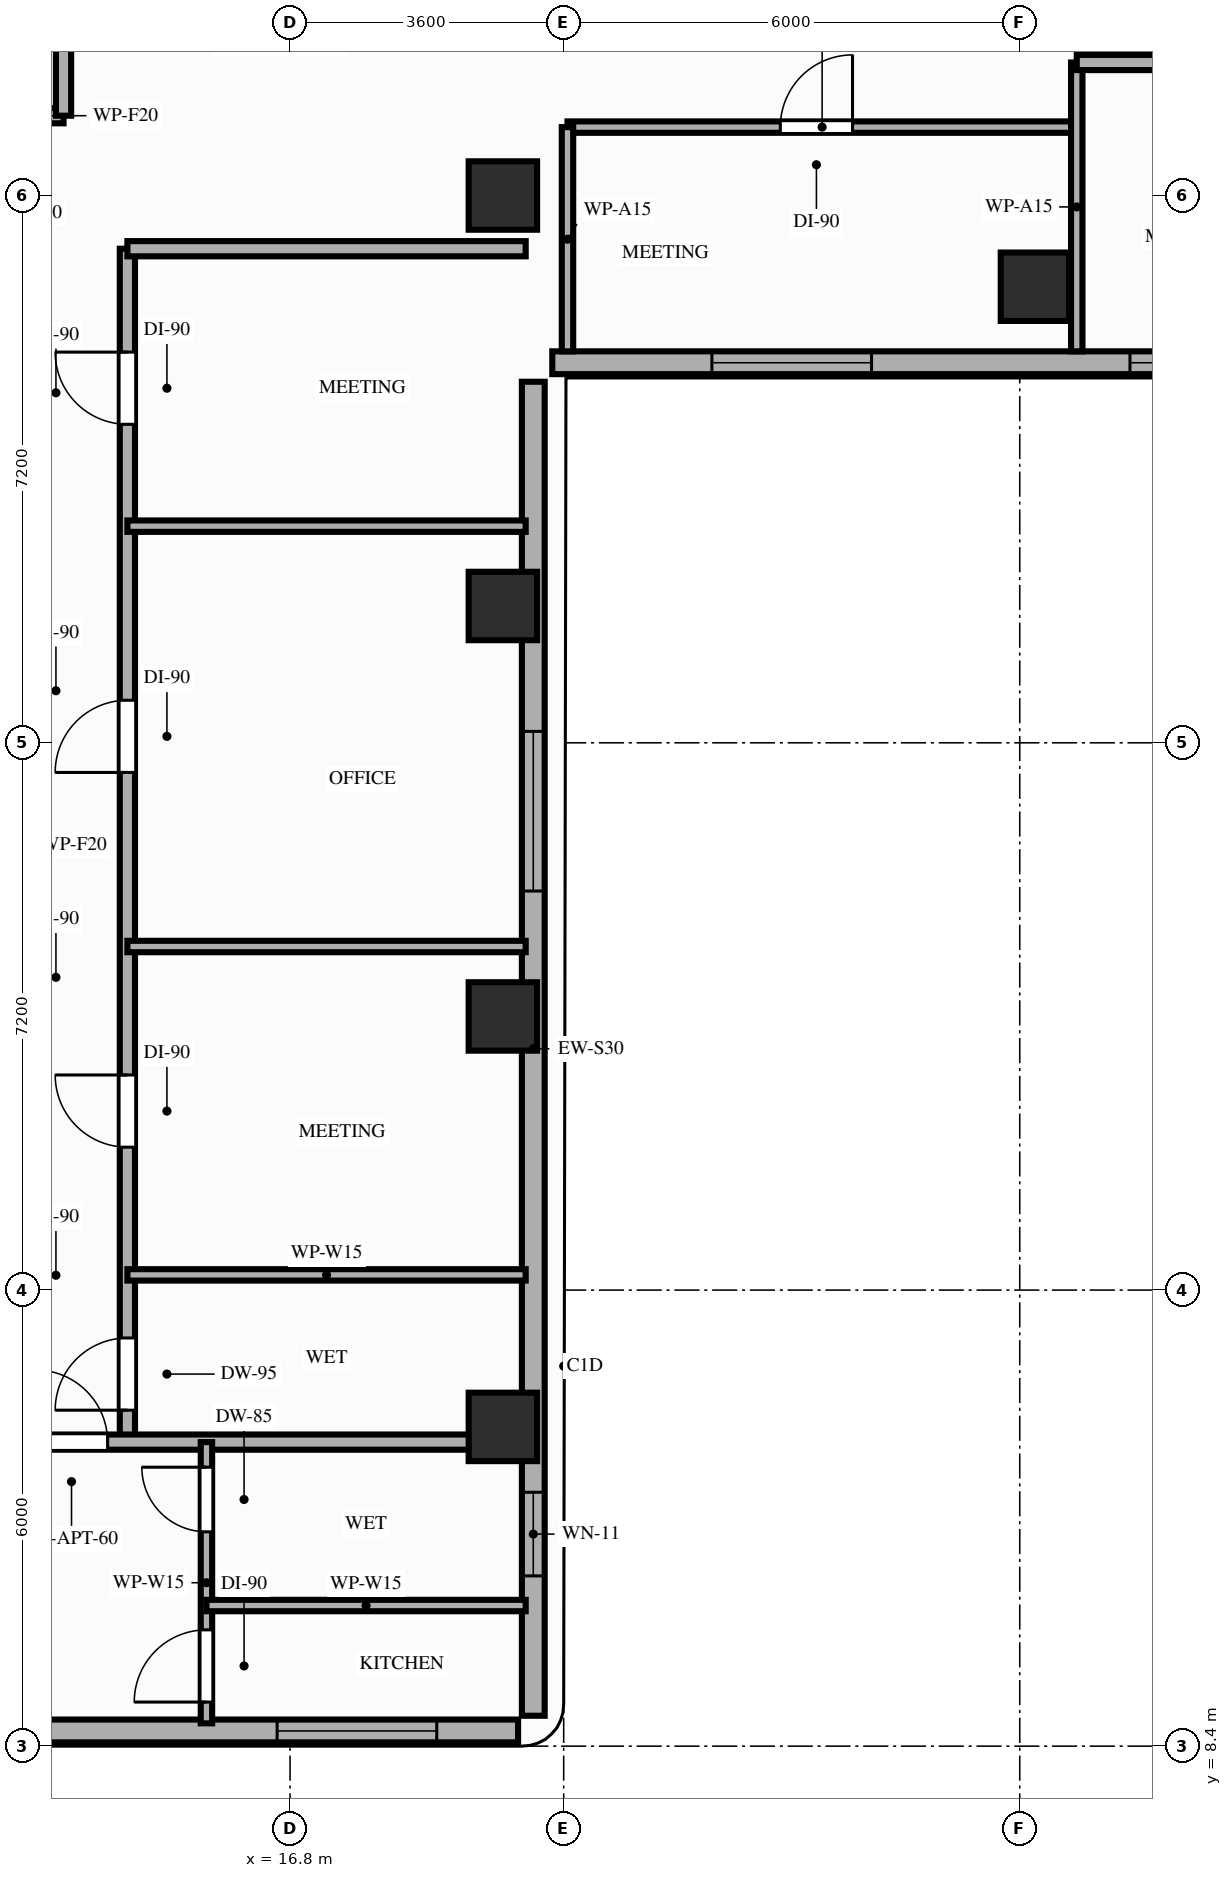
"""IFC4 building model, lengths in metres.
Left out: names, types, materials, properties, quantities, classifications, styles, units other than length and angle.
Written with IfcOpenShell. Run it as: python <this file> out.ifc"""

import sys

from ifc_helpers import new_model, si_unit, direction, frame, frame_2d, origin, origin_2d, place, context, subcontext, project, spatial, rectangle, extrude, element, fill, save


model = new_model("IFC4")
c1 = context("Model", 3, precision=1e-05, world=origin(), true_north=direction((0.0, 1.0)))
c2 = subcontext(c1, "Body", "Model", "MODEL_VIEW")
j1 = project(units=[si_unit("LENGTHUNIT", "METRE"), si_unit("PLANEANGLEUNIT", "RADIAN")], contexts=[c1])
p1 = place(None, origin())
s1 = spatial("IfcSite", under=j1, at=p1, CompositionType="ELEMENT")
p2 = place(p1, origin())
s2 = spatial("IfcBuilding", under=s1, at=p2, CompositionType="ELEMENT")
p3 = place(p2, frame((0.0, 0.0, 188.8)))
s3 = spatial("IfcBuildingStorey", under=s2, at=p3, CompositionType="ELEMENT", Elevation=188.8)
for number, where, z_axis, x_axis in (
    (1, (19.6, 12.6, 0.0), (0.0, 0.0, 1.0), (1.0, 0.0, 0.0)),
    (2, (19.6, 18.0, 0.0), (0.0, 0.0, 1.0), (1.0, 0.0, 0.0)),
    (3, (19.6, 23.4, 0.0), (0.0, 0.0, 1.0), (1.0, 0.0, 0.0)),
    (4, (19.6, 28.8, 0.0), (0.0, 0.0, 1.0), (1.0, 0.0, 0.0)),
    (5, (26.6, 27.6, 0.0), (0.0, 0.0, 1.0), (1.0, 0.0, 0.0)),
):
    element("IfcColumn", number, at=place(p3, frame(where, z_axis=z_axis, x_axis=x_axis)), inside=s3, PredefinedType="COLUMN", context=c2, shape_type="SweptSolid", body=[
        extrude(rectangle(XDim=0.9, YDim=0.9, at=origin_2d()), origin(), (0.0, 0.0, 1.0), 3.2),
    ])
p4 = place(p3, frame((4.0, 8.6, 0.0), z_axis=(0.0, 0.0, 1.0), x_axis=(1.0, 0.0, 0.0)))
e6 = element("IfcWall", 6, at=p4, inside=s3, PredefinedType="STANDARD", context=c2, shape_type="SweptSolid", body=[
    extrude(rectangle(XDim=15.8, YDim=0.3, at=frame_2d((7.9, 0.0))), origin(), (0.0, 0.0, 1.0), 3.02),
])
p5 = place(p4, frame((0.92, 0.0, 0.85)))
e7 = element("IfcOpeningElement", 7, at=p5, cuts=e6, PredefinedType="OPENING", context=c2, shape_type="SweptSolid", body=[
    extrude(rectangle(XDim=2.1, YDim=1.8, at=frame_2d((1.05, 0.9))), frame((0.0, 0.16, 0.0), z_axis=(0.0, -1.0, 0.0), x_axis=(1.0, 0.0, 0.0)), (0.0, 0.0, 1.0), 0.32),
])
p6 = place(p4, frame((6.7, 0.0, 0.85)))
e8 = element("IfcOpeningElement", 8, at=p6, cuts=e6, PredefinedType="OPENING", context=c2, shape_type="SweptSolid", body=[
    extrude(rectangle(XDim=2.1, YDim=1.8, at=frame_2d((1.05, 0.9))), frame((0.0, 0.16, 0.0), z_axis=(0.0, -1.0, 0.0), x_axis=(1.0, 0.0, 0.0)), (0.0, 0.0, 1.0), 0.32),
])
p7 = place(p4, frame((12.63, 0.0, 0.85)))
e9 = element("IfcOpeningElement", 9, at=p7, cuts=e6, PredefinedType="OPENING", context=c2, shape_type="SweptSolid", body=[
    extrude(rectangle(XDim=2.1, YDim=1.8, at=frame_2d((1.05, 0.9))), frame((0.0, 0.16, 0.0), z_axis=(0.0, -1.0, 0.0), x_axis=(1.0, 0.0, 0.0)), (0.0, 0.0, 1.0), 0.32),
])
p8 = place(p3, frame((20.0, 8.8, 0.0), z_axis=(0.0, 0.0, 1.0), x_axis=(0.0, 1.0, 0.0)))
e10 = element("IfcWall", 10, at=p8, inside=s3, PredefinedType="STANDARD", context=c2, shape_type="SweptSolid", body=[
    extrude(rectangle(XDim=17.55, YDim=0.3, at=frame_2d((8.775, 0.0))), origin(), (0.0, 0.0, 1.0), 2.51),
])
p9 = place(p8, frame((1.84, 0.0, 0.85)))
e11 = element("IfcOpeningElement", 11, at=p9, cuts=e10, PredefinedType="OPENING", context=c2, shape_type="SweptSolid", body=[
    extrude(rectangle(XDim=1.1, YDim=1.41, at=frame_2d((0.55, 0.705))), frame((0.0, 0.16, 0.0), z_axis=(0.0, -1.0, 0.0), x_axis=(1.0, 0.0, 0.0)), (0.0, 0.0, 1.0), 0.32),
])
p10 = place(p8, frame((10.85, 0.0, 0.85)))
e12 = element("IfcOpeningElement", 12, at=p10, cuts=e10, PredefinedType="OPENING", context=c2, shape_type="SweptSolid", body=[
    extrude(rectangle(XDim=2.1, YDim=1.41, at=frame_2d((1.05, 0.705))), frame((0.0, 0.16, 0.0), z_axis=(0.0, -1.0, 0.0), x_axis=(1.0, 0.0, 0.0)), (0.0, 0.0, 1.0), 0.32),
])
p11 = place(p3, frame((20.25, 26.6, 0.0), z_axis=(0.0, 0.0, 1.0), x_axis=(1.0, 0.0, 0.0)))
e13 = element("IfcWall", 13, at=p11, inside=s3, PredefinedType="STANDARD", context=c2, shape_type="SweptSolid", body=[
    extrude(rectangle(XDim=21.35, YDim=0.3, at=frame_2d((10.675, 0.0))), origin(), (0.0, 0.0, 1.0), 2.71),
])
p12 = place(p11, frame((13.9, 0.0, 0.0)))
e14 = element("IfcOpeningElement", 14, at=p12, cuts=e13, PredefinedType="OPENING", context=c2, shape_type="SweptSolid", body=[
    extrude(rectangle(XDim=1.3, YDim=2.08, at=frame_2d((0.65, 1.04))), frame((0.0, 0.16, 0.0), z_axis=(0.0, -1.0, 0.0), x_axis=(1.0, 0.0, 0.0)), (0.0, 0.0, 1.0), 0.32),
])
p13 = place(p11, frame((17.73, 0.0, 0.85)))
e15 = element("IfcOpeningElement", 15, at=p13, cuts=e13, PredefinedType="OPENING", context=c2, shape_type="SweptSolid", body=[
    extrude(rectangle(XDim=2.1, YDim=1.61, at=frame_2d((1.05, 0.805))), frame((0.0, 0.16, 0.0), z_axis=(0.0, -1.0, 0.0), x_axis=(1.0, 0.0, 0.0)), (0.0, 0.0, 1.0), 0.32),
])
p14 = place(p11, frame((2.1, 0.0, 0.85)))
e16 = element("IfcOpeningElement", 16, at=p14, cuts=e13, PredefinedType="OPENING", context=c2, shape_type="SweptSolid", body=[
    extrude(rectangle(XDim=2.1, YDim=1.61, at=frame_2d((1.05, 0.805))), frame((0.0, 0.16, 0.0), z_axis=(0.0, -1.0, 0.0), x_axis=(1.0, 0.0, 0.0)), (0.0, 0.0, 1.0), 0.32),
])
p15 = place(p11, frame((7.6, 0.0, 0.85)))
e17 = element("IfcOpeningElement", 17, at=p15, cuts=e13, PredefinedType="OPENING", context=c2, shape_type="SweptSolid", body=[
    extrude(rectangle(XDim=2.1, YDim=1.61, at=frame_2d((1.05, 0.805))), frame((0.0, 0.16, 0.0), z_axis=(0.0, -1.0, 0.0), x_axis=(1.0, 0.0, 0.0)), (0.0, 0.0, 1.0), 0.32),
])
p16 = place(p3, frame((12.55, 29.85, 0.0), z_axis=(0.0, 0.0, 1.0), x_axis=(1.0, 0.0, 0.0)))
e18 = element("IfcWall", 18, at=p16, inside=s3, PredefinedType="PARTITIONING", context=c2, shape_type="SweptSolid", body=[
    extrude(rectangle(XDim=1.27, YDim=0.2, at=frame_2d((0.635, 0.0))), origin(), (0.0, 0.0, 1.0), 3.02),
])
p17 = place(p16, frame((0.21, 0.0, 0.0)))
e19 = element("IfcOpeningElement", 19, at=p17, cuts=e18, PredefinedType="OPENING", context=c2, shape_type="SweptSolid", body=[
    extrude(rectangle(XDim=0.85, YDim=2.05, at=frame_2d((0.425, 1.025))), frame((0.0, 0.11, 0.0), z_axis=(0.0, -1.0, 0.0), x_axis=(1.0, 0.0, 0.0)), (0.0, 0.0, 1.0), 0.22),
])
p18 = place(p3, frame((13.82, 29.85, 0.0), z_axis=(0.0, 0.0, 1.0), x_axis=(0.0, 1.0, 0.0)))
e20 = element("IfcWall", 20, at=p18, inside=s3, PredefinedType="PARTITIONING", context=c2, shape_type="SweptSolid", body=[
    extrude(rectangle(XDim=2.5, YDim=0.2, at=frame_2d((1.25, 0.0))), origin(), (0.0, 0.0, 1.0), 3.02),
])
p19 = place(p3, frame((14.66, 12.4, 0.0), z_axis=(0.0, 0.0, 1.0), x_axis=(0.0, 1.0, 0.0)))
e21 = element("IfcWall", 21, at=p19, inside=s3, PredefinedType="PARTITIONING", context=c2, shape_type="SweptSolid", body=[
    extrude(rectangle(XDim=15.7, YDim=0.2, at=frame_2d((7.85, 0.0))), origin(), (0.0, 0.0, 1.0), 2.51),
])
p20 = place(p19, frame((0.42, 0.0, 0.0)))
e22 = element("IfcOpeningElement", 22, at=p20, cuts=e21, PredefinedType="OPENING", context=c2, shape_type="SweptSolid", body=[
    extrude(rectangle(XDim=0.95, YDim=2.1, at=frame_2d((0.475, 1.05))), frame((0.0, 0.11, 0.0), z_axis=(0.0, -1.0, 0.0), x_axis=(1.0, 0.0, 0.0)), (0.0, 0.0, 1.0), 0.22),
])
p21 = place(p19, frame((3.88, 0.0, 0.0)))
e23 = element("IfcOpeningElement", 23, at=p21, cuts=e21, PredefinedType="OPENING", context=c2, shape_type="SweptSolid", body=[
    extrude(rectangle(XDim=0.95, YDim=2.15, at=frame_2d((0.475, 1.075))), frame((0.0, 0.11, 0.0), z_axis=(0.0, -1.0, 0.0), x_axis=(1.0, 0.0, 0.0)), (0.0, 0.0, 1.0), 0.22),
])
p22 = place(p19, frame((8.81, 0.0, 0.0)))
e24 = element("IfcOpeningElement", 24, at=p22, cuts=e21, PredefinedType="OPENING", context=c2, shape_type="SweptSolid", body=[
    extrude(rectangle(XDim=0.95, YDim=2.15, at=frame_2d((0.475, 1.075))), frame((0.0, 0.11, 0.0), z_axis=(0.0, -1.0, 0.0), x_axis=(1.0, 0.0, 0.0)), (0.0, 0.0, 1.0), 0.22),
])
p23 = place(p19, frame((13.39, 0.0, 0.0)))
e25 = element("IfcOpeningElement", 25, at=p23, cuts=e21, PredefinedType="OPENING", context=c2, shape_type="SweptSolid", body=[
    extrude(rectangle(XDim=0.95, YDim=2.15, at=frame_2d((0.475, 1.075))), frame((0.0, 0.11, 0.0), z_axis=(0.0, -1.0, 0.0), x_axis=(1.0, 0.0, 0.0)), (0.0, 0.0, 1.0), 0.22),
])
p24 = place(p3, frame((3.9, 12.4, 0.0), z_axis=(0.0, 0.0, 1.0), x_axis=(1.0, 0.0, 0.0)))
e26 = element("IfcWall", 26, at=p24, inside=s3, PredefinedType="PARTITIONING", context=c2, shape_type="SweptSolid", body=[
    extrude(rectangle(XDim=16.0, YDim=0.2, at=frame_2d((8.0, 0.0))), origin(), (0.0, 0.0, 1.0), 2.51),
])
p25 = place(p24, frame((9.55, 0.0, 0.0)))
e27 = element("IfcOpeningElement", 27, at=p25, cuts=e26, PredefinedType="OPENING", context=c2, shape_type="SweptSolid", body=[
    extrude(rectangle(XDim=0.95, YDim=2.15, at=frame_2d((0.475, 1.075))), frame((0.0, 0.11, 0.0), z_axis=(0.0, -1.0, 0.0), x_axis=(1.0, 0.0, 0.0)), (0.0, 0.0, 1.0), 0.22),
])
p26 = place(p3, frame((14.66, 28.1, 0.0), z_axis=(0.0, 0.0, 1.0), x_axis=(1.0, 0.0, 0.0)))
e28 = element("IfcWall", 28, at=p26, inside=s3, PredefinedType="PARTITIONING", context=c2, shape_type="SweptSolid", body=[
    extrude(rectangle(XDim=5.24, YDim=0.2, at=frame_2d((2.62, 0.0))), origin(), (0.0, 0.0, 1.0), 2.51),
])
p27 = place(p3, frame((20.45, 29.7, 0.0), z_axis=(0.0, 0.0, 1.0), x_axis=(1.0, 0.0, 0.0)))
e29 = element("IfcWall", 29, at=p27, inside=s3, PredefinedType="PARTITIONING", context=c2, shape_type="SweptSolid", body=[
    extrude(rectangle(XDim=6.7, YDim=0.15, at=frame_2d((3.35, 0.0))), origin(), (0.0, 0.0, 1.0), 3.02),
])
p28 = place(p27, frame((2.8, 0.0, 0.0)))
e30 = element("IfcOpeningElement", 30, at=p28, cuts=e29, PredefinedType="OPENING", context=c2, shape_type="SweptSolid", body=[
    extrude(rectangle(XDim=0.95, YDim=2.15, at=frame_2d((0.475, 1.075))), frame((0.0, 0.085, 0.0), z_axis=(0.0, -1.0, 0.0), x_axis=(1.0, 0.0, 0.0)), (0.0, 0.0, 1.0), 0.17),
])
p29 = place(p3, frame((20.45, 26.75, 0.0), z_axis=(0.0, 0.0, 1.0), x_axis=(0.0, 1.0, 0.0)))
e31 = element("IfcWall", 31, at=p29, inside=s3, PredefinedType="PARTITIONING", context=c2, shape_type="SweptSolid", body=[
    extrude(rectangle(XDim=2.95, YDim=0.15, at=frame_2d((1.475, 0.0))), origin(), (0.0, 0.0, 1.0), 2.51),
])
p30 = place(p3, frame((27.15, 26.75, 0.0), z_axis=(0.0, 0.0, 1.0), x_axis=(0.0, 1.0, 0.0)))
e32 = element("IfcWall", 32, at=p30, inside=s3, PredefinedType="PARTITIONING", context=c2, shape_type="SweptSolid", body=[
    extrude(rectangle(XDim=3.8, YDim=0.15, at=frame_2d((1.9, 0.0))), origin(), (0.0, 0.0, 1.0), 2.51),
])
p31 = place(p3, frame((15.7, 8.7, 0.0), z_axis=(0.0, 0.0, 1.0), x_axis=(0.0, 1.0, 0.0)))
e33 = element("IfcWall", 33, at=p31, inside=s3, PredefinedType="PARTITIONING", context=c2, shape_type="SweptSolid", body=[
    extrude(rectangle(XDim=3.7, YDim=0.15, at=frame_2d((1.85, 0.0))), origin(), (0.0, 0.0, 1.0), 2.51),
])
p32 = place(p31, frame((0.28, 0.0, 0.0)))
e34 = element("IfcOpeningElement", 34, at=p32, cuts=e33, PredefinedType="OPENING", context=c2, shape_type="SweptSolid", body=[
    extrude(rectangle(XDim=0.95, YDim=2.15, at=frame_2d((0.475, 1.075))), frame((0.0, 0.085, 0.0), z_axis=(0.0, -1.0, 0.0), x_axis=(1.0, 0.0, 0.0)), (0.0, 0.0, 1.0), 0.17),
])
p33 = place(p31, frame((2.52, 0.0, 0.0)))
e35 = element("IfcOpeningElement", 35, at=p33, cuts=e33, PredefinedType="OPENING", context=c2, shape_type="SweptSolid", body=[
    extrude(rectangle(XDim=0.85, YDim=2.1, at=frame_2d((0.425, 1.05))), frame((0.0, 0.085, 0.0), z_axis=(0.0, -1.0, 0.0), x_axis=(1.0, 0.0, 0.0)), (0.0, 0.0, 1.0), 0.17),
])
p34 = place(p3, frame((15.7, 10.25, 0.0), z_axis=(0.0, 0.0, 1.0), x_axis=(1.0, 0.0, 0.0)))
e36 = element("IfcWall", 36, at=p34, inside=s3, PredefinedType="PARTITIONING", context=c2, shape_type="SweptSolid", body=[
    extrude(rectangle(XDim=4.2, YDim=0.15, at=frame_2d((2.1, 0.0))), origin(), (0.0, 0.0, 1.0), 3.02),
])
for number, where, z_axis, x_axis in (
    (37, (14.66, 14.6, 0.0), (0.0, 0.0, 1.0), (1.0, 0.0, 0.0)),
    (38, (14.66, 18.92, 0.0), (0.0, 0.0, 1.0), (1.0, 0.0, 0.0)),
    (39, (14.66, 24.45, 0.0), (0.0, 0.0, 1.0), (1.0, 0.0, 0.0)),
):
    element("IfcWall", number, at=place(p3, frame(where, z_axis=z_axis, x_axis=x_axis)), inside=s3, PredefinedType="PARTITIONING", context=c2, shape_type="SweptSolid", body=[
        extrude(rectangle(XDim=5.24, YDim=0.15, at=frame_2d((2.62, 0.0))), origin(), (0.0, 0.0, 1.0), 2.51),
    ])
p35 = place(p3, frame((27.15, 30.55, 0.0), z_axis=(0.0, 0.0, 1.0), x_axis=(1.0, 0.0, 0.0)))
e40 = element("IfcWall", 40, at=p35, inside=s3, PredefinedType="PARTITIONING", context=c2, shape_type="SweptSolid", body=[
    extrude(rectangle(XDim=9.45, YDim=0.2, at=frame_2d((4.725, 0.0))), origin(), (0.0, 0.0, 1.0), 2.51),
])
p36 = place(p35, frame((2.5, 0.0, 0.0)))
e41 = element("IfcOpeningElement", 41, at=p36, cuts=e40, PredefinedType="OPENING", context=c2, shape_type="SweptSolid", body=[
    extrude(rectangle(XDim=0.95, YDim=2.15, at=frame_2d((0.475, 1.075))), frame((0.0, 0.11, 0.0), z_axis=(0.0, -1.0, 0.0), x_axis=(1.0, 0.0, 0.0)), (0.0, 0.0, 1.0), 0.22),
])
p37 = place(p35, frame((7.22, 0.0, 0.0)))
e42 = element("IfcOpeningElement", 42, at=p37, cuts=e40, PredefinedType="OPENING", context=c2, shape_type="SweptSolid", body=[
    extrude(rectangle(XDim=0.95, YDim=2.15, at=frame_2d((0.475, 1.075))), frame((0.0, 0.11, 0.0), z_axis=(0.0, -1.0, 0.0), x_axis=(1.0, 0.0, 0.0)), (0.0, 0.0, 1.0), 0.22),
])
p38 = place(p7, origin())
e43 = element("IfcWindow", 43, at=p38, inside=s3, PartitioningType="SINGLE_PANEL", PredefinedType="WINDOW", context=c2, shape_type="SweptSolid", body=[
    extrude(rectangle(XDim=2.1, YDim=1.8, at=frame_2d((1.05, 0.9))), frame((0.0, 0.03, 0.0), z_axis=(0.0, -1.0, 0.0), x_axis=(1.0, 0.0, 0.0)), (0.0, 0.0, 1.0), 0.06),
])
fill(e9, e43)
p39 = place(p9, origin())
e44 = element("IfcWindow", 44, at=p39, inside=s3, PartitioningType="SINGLE_PANEL", PredefinedType="WINDOW", context=c2, shape_type="SweptSolid", body=[
    extrude(rectangle(XDim=1.1, YDim=1.41, at=frame_2d((0.55, 0.705))), frame((0.0, 0.03, 0.0), z_axis=(0.0, -1.0, 0.0), x_axis=(1.0, 0.0, 0.0)), (0.0, 0.0, 1.0), 0.06),
])
fill(e11, e44)
p40 = place(p10, origin())
e45 = element("IfcWindow", 45, at=p40, inside=s3, PartitioningType="SINGLE_PANEL", PredefinedType="WINDOW", context=c2, shape_type="SweptSolid", body=[
    extrude(rectangle(XDim=2.1, YDim=1.41, at=frame_2d((1.05, 0.705))), frame((0.0, 0.03, 0.0), z_axis=(0.0, -1.0, 0.0), x_axis=(1.0, 0.0, 0.0)), (0.0, 0.0, 1.0), 0.06),
])
fill(e12, e45)
p41 = place(p14, origin())
e46 = element("IfcWindow", 46, at=p41, inside=s3, PartitioningType="SINGLE_PANEL", PredefinedType="WINDOW", context=c2, shape_type="SweptSolid", body=[
    extrude(rectangle(XDim=2.1, YDim=1.61, at=frame_2d((1.05, 0.805))), frame((0.0, 0.03, 0.0), z_axis=(0.0, -1.0, 0.0), x_axis=(1.0, 0.0, 0.0)), (0.0, 0.0, 1.0), 0.06),
])
fill(e16, e46)
p42 = place(p15, origin())
e47 = element("IfcWindow", 47, at=p42, inside=s3, PartitioningType="SINGLE_PANEL", PredefinedType="WINDOW", context=c2, shape_type="SweptSolid", body=[
    extrude(rectangle(XDim=2.1, YDim=1.61, at=frame_2d((1.05, 0.805))), frame((0.0, 0.03, 0.0), z_axis=(0.0, -1.0, 0.0), x_axis=(1.0, 0.0, 0.0)), (0.0, 0.0, 1.0), 0.06),
])
fill(e17, e47)
p43 = place(p28, origin())
e48 = element("IfcDoor", 48, at=p43, inside=s3, OperationType="SINGLE_SWING_RIGHT", PredefinedType="DOOR", context=c2, shape_type="SweptSolid", body=[
    extrude(rectangle(XDim=0.95, YDim=2.15, at=frame_2d((0.475, 1.075))), frame((0.0, 0.025, 0.0), z_axis=(0.0, -1.0, 0.0), x_axis=(1.0, 0.0, 0.0)), (0.0, 0.0, 1.0), 0.05),
])
fill(e30, e48)
p44 = place(p25, origin())
e49 = element("IfcDoor", 49, at=p44, inside=s3, OperationType="SINGLE_SWING_LEFT", PredefinedType="DOOR", context=c2, shape_type="SweptSolid", body=[
    extrude(rectangle(XDim=0.95, YDim=2.15, at=frame_2d((0.475, 1.075))), frame((0.0, 0.025, 0.0), z_axis=(0.0, -1.0, 0.0), x_axis=(1.0, 0.0, 0.0)), (0.0, 0.0, 1.0), 0.05),
])
fill(e27, e49)
p45 = place(p32, origin())
e50 = element("IfcDoor", 50, at=p45, inside=s3, OperationType="SINGLE_SWING_LEFT", PredefinedType="DOOR", context=c2, shape_type="SweptSolid", body=[
    extrude(rectangle(XDim=0.95, YDim=2.15, at=frame_2d((0.475, 1.075))), frame((0.0, 0.025, 0.0), z_axis=(0.0, -1.0, 0.0), x_axis=(1.0, 0.0, 0.0)), (0.0, 0.0, 1.0), 0.05),
])
fill(e34, e50)
p46 = place(p33, origin())
e51 = element("IfcDoor", 51, at=p46, inside=s3, OperationType="SINGLE_SWING_RIGHT", PredefinedType="DOOR", context=c2, shape_type="SweptSolid", body=[
    extrude(rectangle(XDim=0.85, YDim=2.1, at=frame_2d((0.425, 1.05))), frame((0.0, 0.025, 0.0), z_axis=(0.0, -1.0, 0.0), x_axis=(1.0, 0.0, 0.0)), (0.0, 0.0, 1.0), 0.05),
])
fill(e35, e51)
p47 = place(p20, origin())
e52 = element("IfcDoor", 52, at=p47, inside=s3, OperationType="SINGLE_SWING_LEFT", PredefinedType="DOOR", context=c2, shape_type="SweptSolid", body=[
    extrude(rectangle(XDim=0.95, YDim=2.1, at=frame_2d((0.475, 1.05))), frame((0.0, 0.025, 0.0), z_axis=(0.0, -1.0, 0.0), x_axis=(1.0, 0.0, 0.0)), (0.0, 0.0, 1.0), 0.05),
])
fill(e22, e52)
p48 = place(p21, origin())
e53 = element("IfcDoor", 53, at=p48, inside=s3, OperationType="SINGLE_SWING_RIGHT", PredefinedType="DOOR", context=c2, shape_type="SweptSolid", body=[
    extrude(rectangle(XDim=0.95, YDim=2.15, at=frame_2d((0.475, 1.075))), frame((0.0, 0.025, 0.0), z_axis=(0.0, -1.0, 0.0), x_axis=(1.0, 0.0, 0.0)), (0.0, 0.0, 1.0), 0.05),
])
fill(e23, e53)
p49 = place(p22, origin())
e54 = element("IfcDoor", 54, at=p49, inside=s3, OperationType="SINGLE_SWING_LEFT", PredefinedType="DOOR", context=c2, shape_type="SweptSolid", body=[
    extrude(rectangle(XDim=0.95, YDim=2.15, at=frame_2d((0.475, 1.075))), frame((0.0, 0.025, 0.0), z_axis=(0.0, -1.0, 0.0), x_axis=(1.0, 0.0, 0.0)), (0.0, 0.0, 1.0), 0.05),
])
fill(e24, e54)
p50 = place(p23, origin())
e55 = element("IfcDoor", 55, at=p50, inside=s3, OperationType="SINGLE_SWING_RIGHT", PredefinedType="DOOR", context=c2, shape_type="SweptSolid", body=[
    extrude(rectangle(XDim=0.95, YDim=2.15, at=frame_2d((0.475, 1.075))), frame((0.0, 0.025, 0.0), z_axis=(0.0, -1.0, 0.0), x_axis=(1.0, 0.0, 0.0)), (0.0, 0.0, 1.0), 0.05),
])
fill(e25, e55)
save(model, sys.argv[1])
